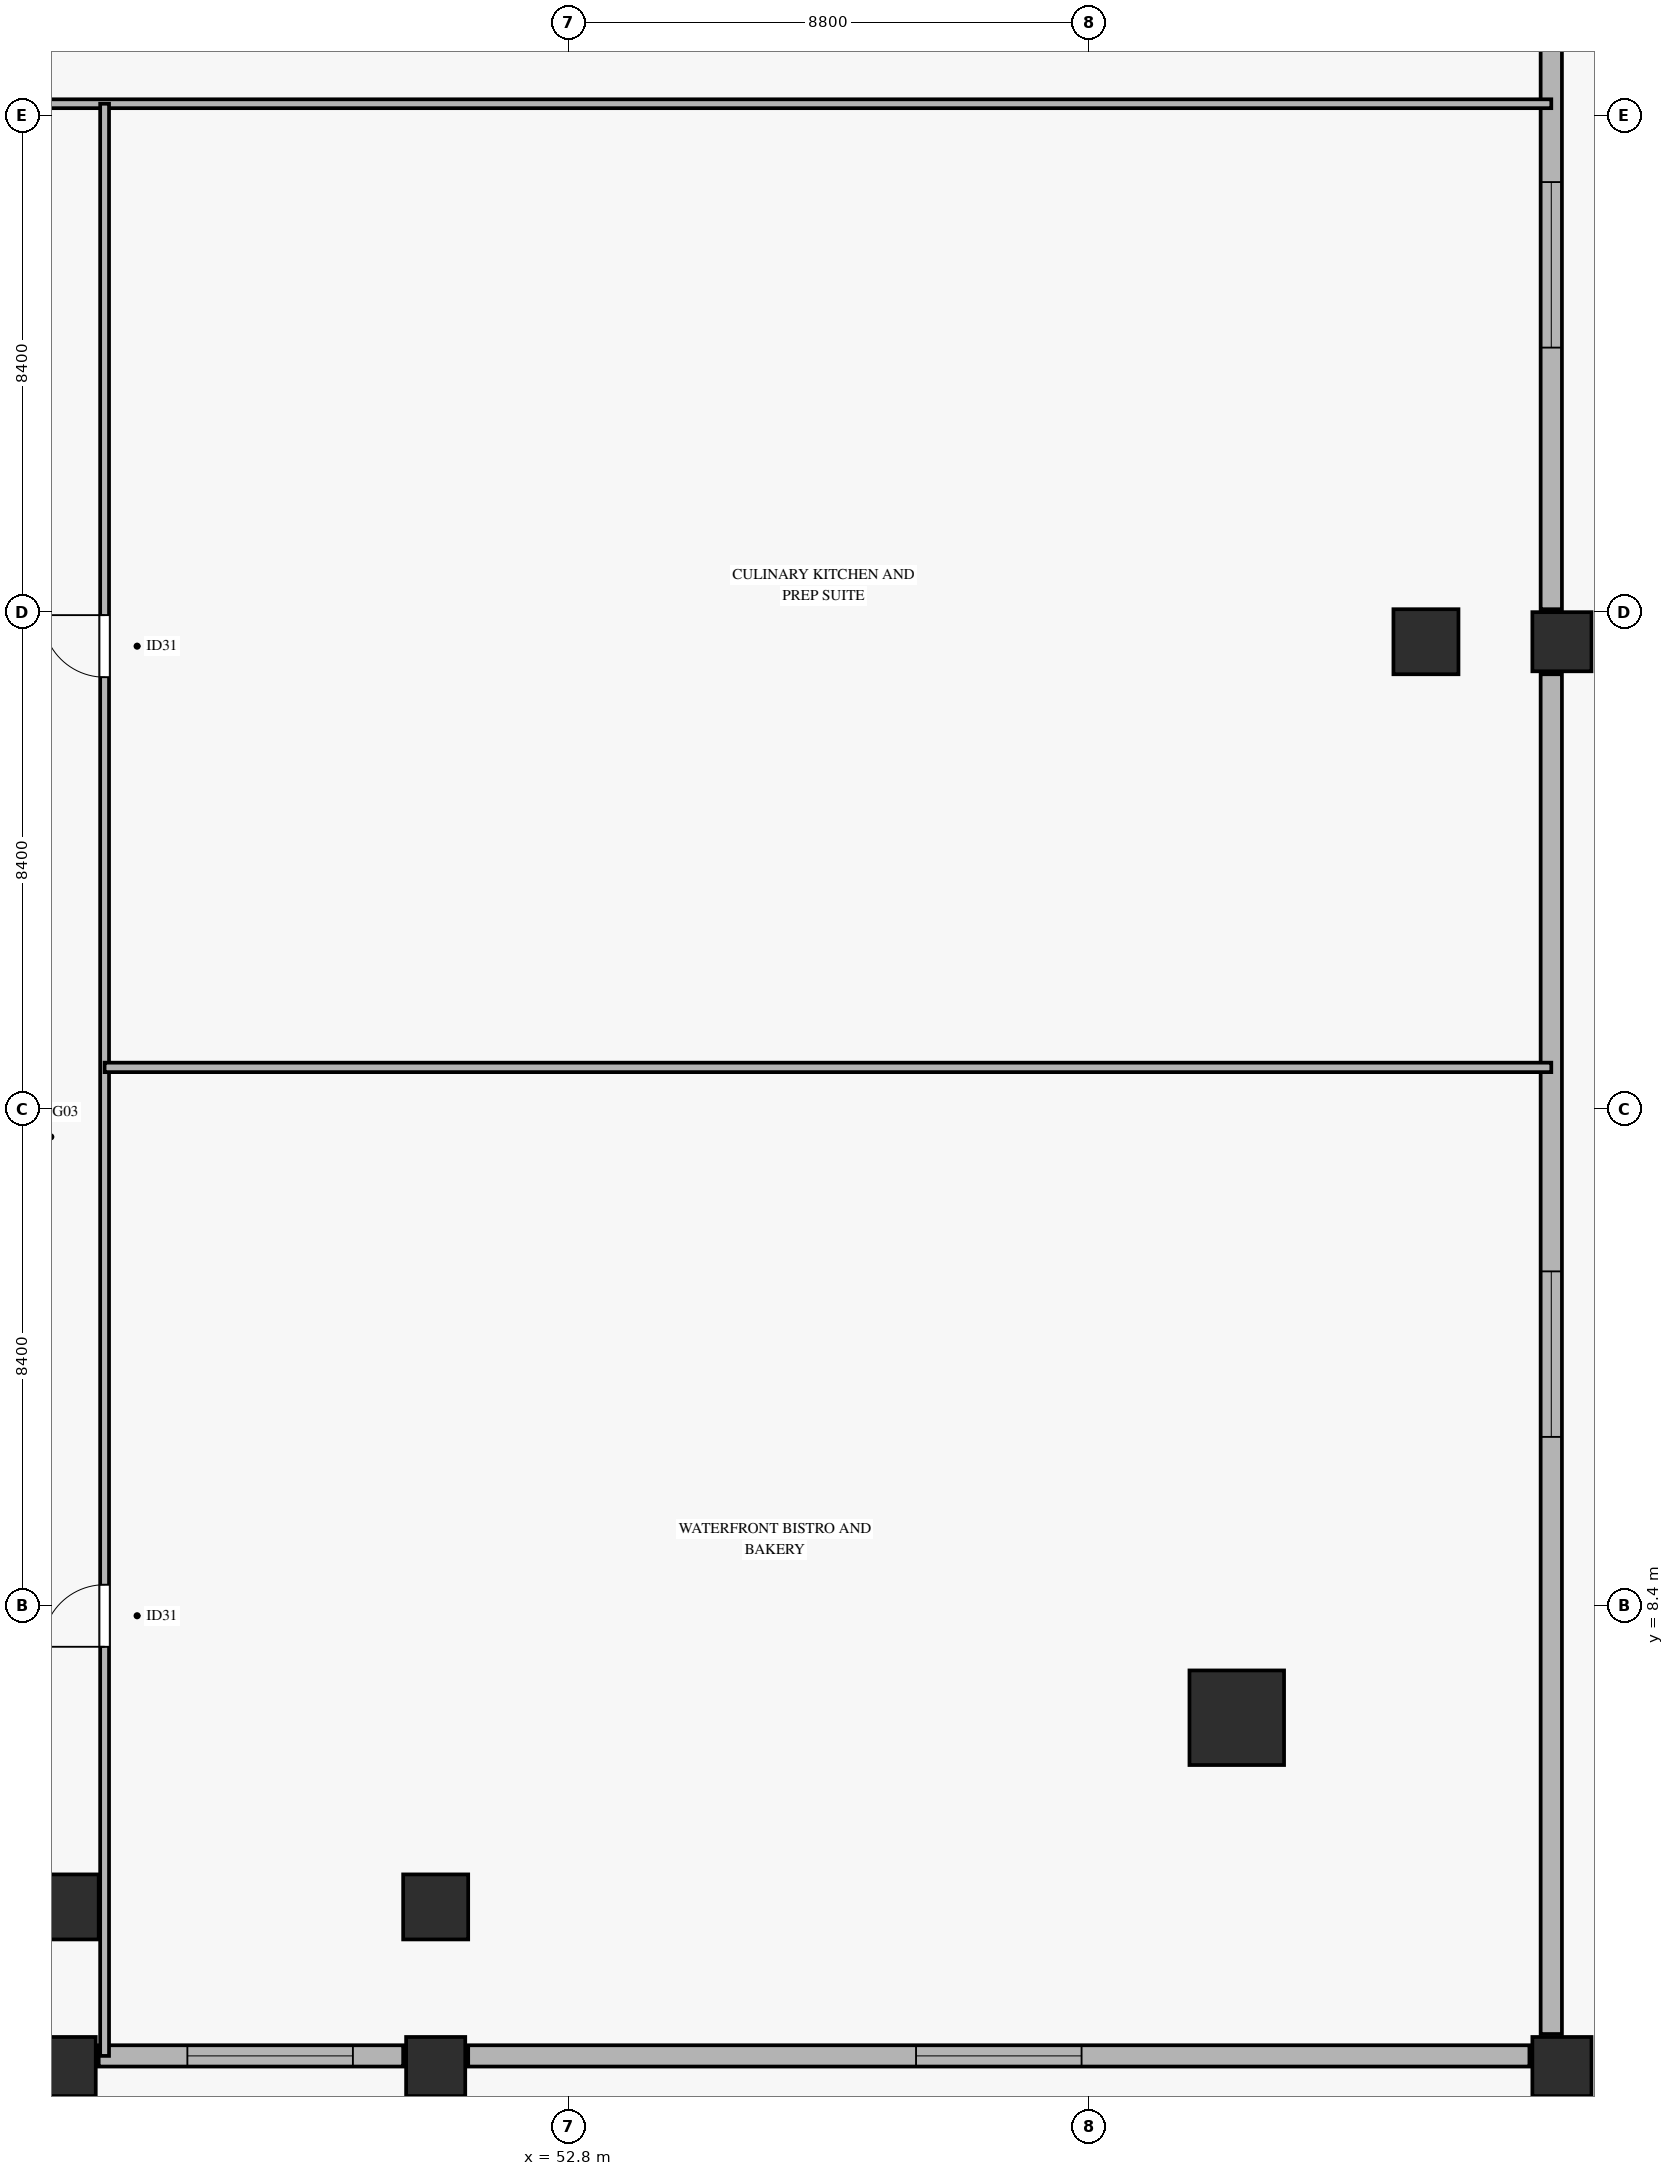
"""IFC4 building model, lengths in metres.
Left out: names, types, materials, properties, quantities, classifications, styles, units other than length and angle.
Written with IfcOpenShell. Run it as: python <this file> out.ifc"""

import sys

from ifc_helpers import new_model, si_unit, direction, frame, frame_2d, origin, origin_2d, place, context, subcontext, project, spatial, rectangle, hollow_rectangle, extrude, source, transform, mapped, element, fill, save


model = new_model("IFC4")
c1 = context("Model", 3, precision=1e-05, world=origin(), true_north=direction((0.0, 1.0)))
c2 = subcontext(c1, "Body", "Model", "MODEL_VIEW")
j1 = project(units=[si_unit("LENGTHUNIT", "METRE"), si_unit("PLANEANGLEUNIT", "RADIAN")], contexts=[c1])
p1 = place(None, origin())
s1 = spatial("IfcSite", under=j1, at=p1, CompositionType="ELEMENT")
p2 = place(p1, origin())
s2 = spatial("IfcBuilding", under=s1, at=p2, CompositionType="ELEMENT")
p3 = place(p2, frame((0.0, 0.0, 5.6)))
s3 = spatial("IfcBuildingStorey", under=s2, at=p3, CompositionType="ELEMENT", Elevation=5.6)
m1 = source(origin(), c2, "Body", "SweptSolid", [
    extrude(hollow_rectangle(XDim=1.6, YDim=1.6, WallThickness=0.075, at=origin_2d()), origin(), (0.0, 0.0, 1.0), 4.54),
])
p4 = place(p3, frame((64.1, 6.5, 0.0), z_axis=(0.0, 0.0, 1.0), x_axis=(1.0, 0.0, 0.0)))
e1 = element("IfcColumn", 1, at=p4, inside=s3, PredefinedType="COLUMN", context=c2, shape_type="MappedRepresentation", body=[
    mapped(m1, transform((0.0, 0.0, 0.0), x_axis=(1.0, 0.0, 0.0), y_axis=(0.0, 1.0, 0.0), z_axis=(0.0, 0.0, 1.0), scale=1.0)),
])
m2 = source(origin(), c2, "Body", "SweptSolid", [
    extrude(hollow_rectangle(XDim=1.1, YDim=1.1, WallThickness=0.05, at=origin_2d()), origin(), (0.0, 0.0, 1.0), 4.54),
])
for number, where, z_axis, x_axis in (
    (2, (44.3, 3.3, 0.0), (0.0, 0.0, 1.0), (1.0, 0.0, 0.0)),
    (3, (50.55, 3.3, 0.0), (0.0, 0.0, 1.0), (1.0, 0.0, 0.0)),
    (4, (67.3, 24.7, 0.0), (0.0, 0.0, 1.0), (1.0, 0.0, 0.0)),
):
    element("IfcColumn", number, at=place(p3, frame(where, z_axis=z_axis, x_axis=x_axis)), inside=s3, PredefinedType="COLUMN", context=c2, shape_type="MappedRepresentation", body=[
        mapped(m2, transform((0.0, 0.0, 0.0), x_axis=(1.0, 0.0, 0.0), y_axis=(0.0, 1.0, 0.0), z_axis=(0.0, 0.0, 1.0), scale=1.0)),
    ])
m3 = source(origin(), c2, "Body", "SweptSolid", [
    extrude(hollow_rectangle(XDim=1.0, YDim=1.0, WallThickness=0.045, at=origin_2d()), origin(), (0.0, 0.0, 1.0), 4.54),
])
for number, where, z_axis, x_axis in (
    (5, (44.3, 0.6, 0.0), (0.0, 0.0, 1.0), (1.0, 0.0, 0.0)),
    (6, (50.55, 0.6, 0.0), (0.0, 0.0, 1.0), (1.0, 0.0, 0.0)),
    (7, (69.6, 0.6, 0.0), (0.0, 0.0, 1.0), (1.0, 0.0, 0.0)),
    (8, (69.6, 24.7, 0.0), (0.0, 0.0, 1.0), (1.0, 0.0, 0.0)),
):
    element("IfcColumn", number, at=place(p3, frame(where, z_axis=z_axis, x_axis=x_axis)), inside=s3, PredefinedType="COLUMN", context=c2, shape_type="MappedRepresentation", body=[
        mapped(m3, transform((0.0, 0.0, 0.0), x_axis=(1.0, 0.0, 0.0), y_axis=(0.0, 1.0, 0.0), z_axis=(0.0, 0.0, 1.0), scale=1.0)),
    ])
p5 = place(p3, frame((44.85, 0.78, 0.0), z_axis=(0.0, 0.0, 1.0), x_axis=(1.0, 0.0, 0.0)))
e9 = element("IfcWall", 9, at=p5, inside=s3, PredefinedType="SOLIDWALL", context=c2, shape_type="SweptSolid", body=[
    extrude(rectangle(XDim=5.15, YDim=0.36, at=frame_2d((2.575, 0.0))), origin(), (0.0, 0.0, 1.0), 3.42),
])
p6 = place(p5, frame((1.5, 0.0, 0.72)))
e10 = element("IfcOpeningElement", 10, at=p6, cuts=e9, PredefinedType="OPENING", context=c2, shape_type="SweptSolid", body=[
    extrude(rectangle(XDim=2.8, YDim=2.0, at=frame_2d((1.4, 1.0))), frame((0.0, 0.19, 0.0), z_axis=(0.0, -1.0, 0.0), x_axis=(1.0, 0.0, 0.0)), (0.0, 0.0, 1.0), 0.38),
])
p7 = place(p3, frame((51.1, 0.78, 0.0), z_axis=(0.0, 0.0, 1.0), x_axis=(1.0, 0.0, 0.0)))
e11 = element("IfcWall", 11, at=p7, inside=s3, PredefinedType="SOLIDWALL", context=c2, shape_type="SweptSolid", body=[
    extrude(rectangle(XDim=17.95, YDim=0.36, at=frame_2d((8.975, 0.0))), origin(), (0.0, 0.0, 1.0), 3.42),
])
p8 = place(p7, frame((7.575, 0.0, 0.72)))
e12 = element("IfcOpeningElement", 12, at=p8, cuts=e11, PredefinedType="OPENING", context=c2, shape_type="SweptSolid", body=[
    extrude(rectangle(XDim=2.8, YDim=2.0, at=frame_2d((1.4, 1.0))), frame((0.0, 0.19, 0.0), z_axis=(0.0, -1.0, 0.0), x_axis=(1.0, 0.0, 0.0)), (0.0, 0.0, 1.0), 0.38),
])
p9 = place(p3, frame((69.42, 1.15, 0.0), z_axis=(0.0, 0.0, 1.0), x_axis=(0.0, 1.0, 0.0)))
e13 = element("IfcWall", 13, at=p9, inside=s3, PredefinedType="SOLIDWALL", context=c2, shape_type="SweptSolid", body=[
    extrude(rectangle(XDim=23.0, YDim=0.36, at=frame_2d((11.5, 0.0))), origin(), (0.0, 0.0, 1.0), 3.42),
])
p10 = place(p9, frame((10.1, 0.0, 0.72)))
e14 = element("IfcOpeningElement", 14, at=p10, cuts=e13, PredefinedType="OPENING", context=c2, shape_type="SweptSolid", body=[
    extrude(rectangle(XDim=2.8, YDim=2.0, at=frame_2d((1.4, 1.0))), frame((0.0, 0.19, 0.0), z_axis=(0.0, -1.0, 0.0), x_axis=(1.0, 0.0, 0.0)), (0.0, 0.0, 1.0), 0.38),
])
p11 = place(p3, frame((69.42, 25.25, 0.0), z_axis=(0.0, 0.0, 1.0), x_axis=(0.0, 1.0, 0.0)))
e15 = element("IfcWall", 15, at=p11, inside=s3, PredefinedType="SOLIDWALL", context=c2, shape_type="SweptSolid", body=[
    extrude(rectangle(XDim=11.65, YDim=0.36, at=frame_2d((5.825, 0.0))), origin(), (0.0, 0.0, 1.0), 3.42),
])
p12 = place(p11, frame((4.425, 0.0, 0.72)))
e16 = element("IfcOpeningElement", 16, at=p12, cuts=e15, PredefinedType="OPENING", context=c2, shape_type="SweptSolid", body=[
    extrude(rectangle(XDim=2.8, YDim=2.0, at=frame_2d((1.4, 1.0))), frame((0.0, 0.19, 0.0), z_axis=(0.0, -1.0, 0.0), x_axis=(1.0, 0.0, 0.0)), (0.0, 0.0, 1.0), 0.38),
])
p13 = place(p3, frame((0.98, 33.8, 0.0), z_axis=(0.0, 0.0, 1.0), x_axis=(1.0, 0.0, 0.0)))
e17 = element("IfcWall", 17, at=p13, inside=s3, PredefinedType="PARTITIONING", context=c2, shape_type="SweptSolid", body=[
    extrude(rectangle(XDim=68.44, YDim=0.15, at=frame_2d((34.22, 0.0))), origin(), (0.0, 0.0, 1.0), 3.425),
])
p14 = place(p13, frame((25.27, 0.0, 0.0)))
e18 = element("IfcOpeningElement", 18, at=p14, cuts=e17, PredefinedType="OPENING", context=c2, shape_type="SweptSolid", body=[
    extrude(rectangle(XDim=1.05, YDim=2.15, at=frame_2d((0.525, 1.075))), frame((0.0, 0.085, 0.0), z_axis=(0.0, -1.0, 0.0), x_axis=(1.0, 0.0, 0.0)), (0.0, 0.0, 1.0), 0.17),
])
p15 = place(p13, frame((38.22, 0.0, 0.0)))
e19 = element("IfcOpeningElement", 19, at=p15, cuts=e17, PredefinedType="OPENING", context=c2, shape_type="SweptSolid", body=[
    extrude(rectangle(XDim=1.05, YDim=2.15, at=frame_2d((0.525, 1.075))), frame((0.0, 0.085, 0.0), z_axis=(0.0, -1.0, 0.0), x_axis=(1.0, 0.0, 0.0)), (0.0, 0.0, 1.0), 0.17),
])
p16 = place(p3, frame((44.95, 0.78, 0.0), z_axis=(0.0, 0.0, 1.0), x_axis=(0.0, 1.0, 0.0)))
e20 = element("IfcWall", 20, at=p16, inside=s3, PredefinedType="PARTITIONING", context=c2, shape_type="SweptSolid", body=[
    extrude(rectangle(XDim=33.02, YDim=0.15, at=frame_2d((16.51, 0.0))), origin(), (0.0, 0.0, 1.0), 3.425),
])
p17 = place(p16, frame((6.92, 0.0, 0.0)))
e21 = element("IfcOpeningElement", 21, at=p17, cuts=e20, PredefinedType="OPENING", context=c2, shape_type="SweptSolid", body=[
    extrude(rectangle(XDim=1.05, YDim=2.15, at=frame_2d((0.525, 1.075))), frame((0.0, 0.085, 0.0), z_axis=(0.0, -1.0, 0.0), x_axis=(1.0, 0.0, 0.0)), (0.0, 0.0, 1.0), 0.17),
])
p18 = place(p16, frame((23.32, 0.0, 0.0)))
e22 = element("IfcOpeningElement", 22, at=p18, cuts=e20, PredefinedType="OPENING", context=c2, shape_type="SweptSolid", body=[
    extrude(rectangle(XDim=1.05, YDim=2.15, at=frame_2d((0.525, 1.075))), frame((0.0, 0.085, 0.0), z_axis=(0.0, -1.0, 0.0), x_axis=(1.0, 0.0, 0.0)), (0.0, 0.0, 1.0), 0.17),
])
p19 = place(p3, frame((44.95, 17.5, 0.0), z_axis=(0.0, 0.0, 1.0), x_axis=(1.0, 0.0, 0.0)))
e23 = element("IfcWall", 23, at=p19, inside=s3, PredefinedType="PARTITIONING", context=c2, shape_type="SweptSolid", body=[
    extrude(rectangle(XDim=24.47, YDim=0.16, at=frame_2d((12.235, 0.0))), origin(), (0.0, 0.0, 1.0), 3.425),
])
m4 = source(origin(), c2, "Body", "SweptSolid", [
    extrude(rectangle(XDim=2.8, YDim=2.0, at=frame_2d((1.4, 1.0))), frame((0.0, 0.03, 0.0), z_axis=(0.0, -1.0, 0.0), x_axis=(1.0, 0.0, 0.0)), (0.0, 0.0, 1.0), 0.06),
])
p20 = place(p6, origin())
e24 = element("IfcWindow", 24, at=p20, inside=s3, PartitioningType="SINGLE_PANEL", PredefinedType="WINDOW", context=c2, shape_type="MappedRepresentation", body=[
    mapped(m4, transform((0.0, 0.0, 0.0), x_axis=(1.0, 0.0, 0.0), y_axis=(0.0, 1.0, 0.0), z_axis=(0.0, 0.0, 1.0), scale=1.0)),
])
fill(e10, e24)
p21 = place(p8, origin())
e25 = element("IfcWindow", 25, at=p21, inside=s3, PartitioningType="SINGLE_PANEL", PredefinedType="WINDOW", context=c2, shape_type="MappedRepresentation", body=[
    mapped(m4, transform((0.0, 0.0, 0.0), x_axis=(1.0, 0.0, 0.0), y_axis=(0.0, 1.0, 0.0), z_axis=(0.0, 0.0, 1.0), scale=1.0)),
])
fill(e12, e25)
p22 = place(p10, origin())
e26 = element("IfcWindow", 26, at=p22, inside=s3, PartitioningType="SINGLE_PANEL", PredefinedType="WINDOW", context=c2, shape_type="MappedRepresentation", body=[
    mapped(m4, transform((0.0, 0.0, 0.0), x_axis=(1.0, 0.0, 0.0), y_axis=(0.0, 1.0, 0.0), z_axis=(0.0, 0.0, 1.0), scale=1.0)),
])
fill(e14, e26)
p23 = place(p12, origin())
e27 = element("IfcWindow", 27, at=p23, inside=s3, PartitioningType="SINGLE_PANEL", PredefinedType="WINDOW", context=c2, shape_type="MappedRepresentation", body=[
    mapped(m4, transform((0.0, 0.0, 0.0), x_axis=(1.0, 0.0, 0.0), y_axis=(0.0, 1.0, 0.0), z_axis=(0.0, 0.0, 1.0), scale=1.0)),
])
fill(e16, e27)
m5 = source(origin(), c2, "Body", "SweptSolid", [
    extrude(rectangle(XDim=1.05, YDim=2.15, at=frame_2d((0.525, 1.075))), frame((0.0, 0.025, 0.0), z_axis=(0.0, -1.0, 0.0), x_axis=(1.0, 0.0, 0.0)), (0.0, 0.0, 1.0), 0.05),
])
p24 = place(p17, origin())
e28 = element("IfcDoor", 28, at=p24, inside=s3, OperationType="SINGLE_SWING_LEFT", PredefinedType="DOOR", context=c2, shape_type="MappedRepresentation", body=[
    mapped(m5, transform((0.0, 0.0, 0.0), x_axis=(1.0, 0.0, 0.0), y_axis=(0.0, 1.0, 0.0), z_axis=(0.0, 0.0, 1.0), scale=1.0)),
])
fill(e21, e28)
p25 = place(p18, origin())
e29 = element("IfcDoor", 29, at=p25, inside=s3, OperationType="SINGLE_SWING_RIGHT", PredefinedType="DOOR", context=c2, shape_type="MappedRepresentation", body=[
    mapped(m5, transform((0.0, 0.0, 0.0), x_axis=(1.0, 0.0, 0.0), y_axis=(0.0, 1.0, 0.0), z_axis=(0.0, 0.0, 1.0), scale=1.0)),
])
fill(e22, e29)
save(model, sys.argv[1])
